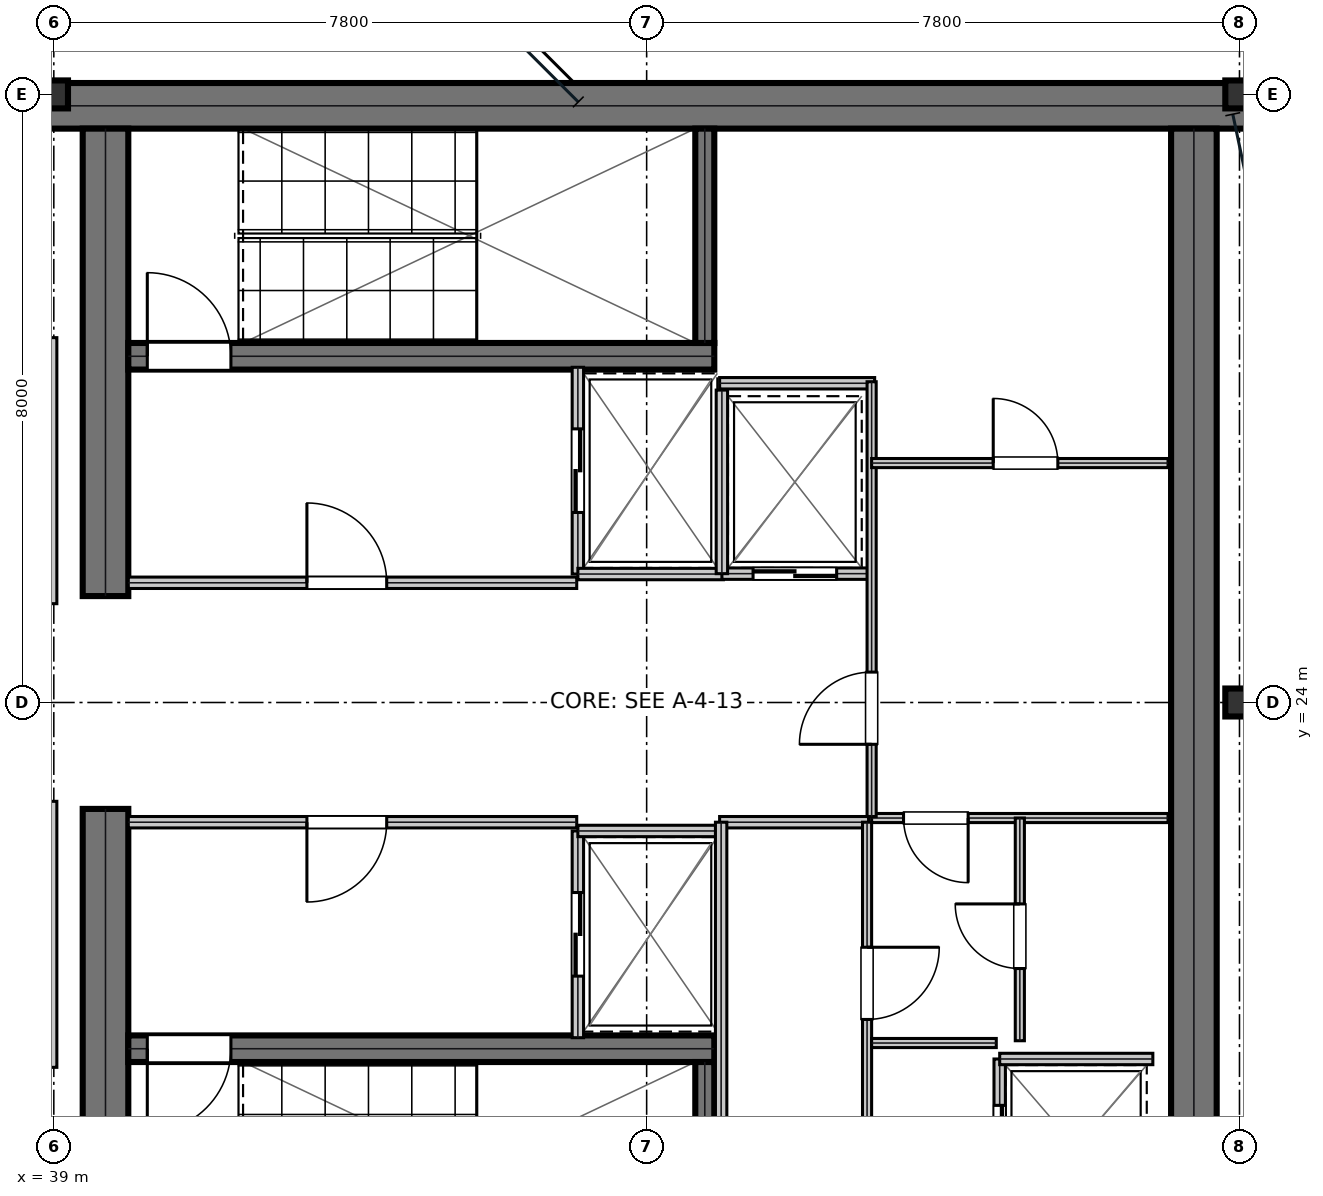
"""IFC4 building model, lengths in metres.
Left out: names, types, materials, properties, quantities, classifications, styles, units other than length and angle.
Written with IfcOpenShell. Run it as: python <this file> out.ifc"""

import sys

from ifc_helpers import new_model, si_unit, direction, frame, frame_2d, origin, origin_2d, place, context, subcontext, project, spatial, rectangle, i_section, extrude, element, fill, save


model = new_model("IFC4")
c1 = context("Model", 3, precision=1e-05, world=origin(), true_north=direction((0.0, 1.0)))
c2 = subcontext(c1, "Body", "Model", "MODEL_VIEW")
j1 = project(units=[si_unit("LENGTHUNIT", "METRE"), si_unit("PLANEANGLEUNIT", "RADIAN")], contexts=[c1])
p1 = place(None, origin())
s1 = spatial("IfcSite", under=j1, at=p1, CompositionType="ELEMENT")
p2 = place(p1, origin())
s2 = spatial("IfcBuilding", under=s1, at=p2, CompositionType="ELEMENT")
p3 = place(p2, frame((0.0, 0.0, 307.35)))
s3 = spatial("IfcBuildingStorey", under=s2, at=p3, CompositionType="ELEMENT", Elevation=307.35)
p4 = place(p3, frame((38.8, 31.85, 0.0), z_axis=(0.0, 0.0, 1.0), x_axis=(1.0, 0.0, 0.0)))
e1 = element("IfcWall", 1, at=p4, inside=s3, PredefinedType="SHEAR", context=c2, shape_type="SweptSolid", body=[
    extrude(rectangle(XDim=16.0, YDim=0.6, at=frame_2d((8.0, 0.0))), origin(), (0.0, 0.0, 1.0), 3.81),
])
for number, where, z_axis, x_axis in (
    (2, (39.68, 16.45, 0.0), (0.0, 0.0, 1.0), (0.0, 1.0, 0.0)),
    (3, (39.68, 25.4, 0.0), (0.0, 0.0, 1.0), (0.0, 1.0, 0.0)),
):
    element("IfcWall", number, at=place(p3, frame(where, z_axis=z_axis, x_axis=x_axis)), inside=s3, PredefinedType="SHEAR", context=c2, shape_type="SweptSolid", body=[
        extrude(rectangle(XDim=6.15, YDim=0.6, at=frame_2d((3.075, 0.0))), origin(), (0.0, 0.0, 1.0), 3.81),
    ])
p5 = place(p3, frame((54.0, 16.45, 0.0), z_axis=(0.0, 0.0, 1.0), x_axis=(0.0, 1.0, 0.0)))
e4 = element("IfcWall", 4, at=p5, inside=s3, PredefinedType="SHEAR", context=c2, shape_type="SweptSolid", body=[
    extrude(rectangle(XDim=15.1, YDim=0.6, at=frame_2d((7.55, 0.0))), origin(), (0.0, 0.0, 1.0), 3.81),
])
p6 = place(p3, frame((39.98, 28.555, 0.0), z_axis=(0.0, 0.0, 1.0), x_axis=(1.0, 0.0, 0.0)))
e5 = element("IfcWall", 5, at=p6, inside=s3, PredefinedType="SHEAR", context=c2, shape_type="SweptSolid", body=[
    extrude(rectangle(XDim=7.71, YDim=0.35, at=frame_2d((3.855, 0.0))), origin(), (0.0, 0.0, 1.0), 3.81),
])
p7 = place(p6, frame((0.25, 0.0, 0.0)))
e6 = element("IfcOpeningElement", 6, at=p7, cuts=e5, PredefinedType="OPENING", context=c2, shape_type="SweptSolid", body=[
    extrude(rectangle(XDim=1.1, YDim=2.15, at=frame_2d((0.55, 1.075))), frame((0.0, 0.185, 0.0), z_axis=(0.0, -1.0, 0.0), x_axis=(1.0, 0.0, 0.0)), (0.0, 0.0, 1.0), 0.37),
])
p8 = place(p3, frame((39.98, 19.445, 0.0), z_axis=(0.0, 0.0, 1.0), x_axis=(1.0, 0.0, 0.0)))
e7 = element("IfcWall", 7, at=p8, inside=s3, PredefinedType="SHEAR", context=c2, shape_type="SweptSolid", body=[
    extrude(rectangle(XDim=7.71, YDim=0.35, at=frame_2d((3.855, 0.0))), origin(), (0.0, 0.0, 1.0), 3.81),
])
p9 = place(p8, frame((0.25, 0.0, 0.0)))
e8 = element("IfcOpeningElement", 8, at=p9, cuts=e7, PredefinedType="OPENING", context=c2, shape_type="SweptSolid", body=[
    extrude(rectangle(XDim=1.1, YDim=2.15, at=frame_2d((0.55, 1.075))), frame((0.0, 0.185, 0.0), z_axis=(0.0, -1.0, 0.0), x_axis=(1.0, 0.0, 0.0)), (0.0, 0.0, 1.0), 0.37),
])
for number, where, z_axis, x_axis in (
    (9, (47.565, 28.73, 0.0), (0.0, 0.0, 1.0), (0.0, 1.0, 0.0)),
    (10, (47.565, 16.45, 0.0), (0.0, 0.0, 1.0), (0.0, 1.0, 0.0)),
):
    element("IfcWall", number, at=place(p3, frame(where, z_axis=z_axis, x_axis=x_axis)), inside=s3, PredefinedType="SHEAR", context=c2, shape_type="SweptSolid", body=[
        extrude(rectangle(XDim=2.82, YDim=0.25, at=frame_2d((1.41, 0.0))), origin(), (0.0, 0.0, 1.0), 3.81),
    ])
for number, where, z_axis, x_axis in (
    (11, (39.0, 32.0, 0.0), (0.0, 0.0, 1.0), (1.0, 0.0, 0.0)),
    (12, (54.6, 24.0, 0.0), (0.0, 0.0, 1.0), (1.0, 0.0, 0.0)),
    (13, (54.6, 32.0, 0.0), (0.0, 0.0, 1.0), (1.0, 0.0, 0.0)),
):
    element("IfcColumn", number, at=place(p3, frame(where, z_axis=z_axis, x_axis=x_axis)), inside=s3, PredefinedType="COLUMN", context=c2, shape_type="SweptSolid", body=[
        extrude(i_section(OverallWidth=0.373, OverallDepth=0.368, WebThickness=0.015, FlangeThickness=0.024, at=origin_2d()), origin(), (0.0, 0.0, 1.0), 4.044),
    ])
p10 = place(p3, frame((39.98, 25.575, 0.0), z_axis=(0.0, 0.0, 1.0), x_axis=(1.0, 0.0, 0.0)))
e14 = element("IfcWall", 14, at=p10, inside=s3, PredefinedType="PARTITIONING", context=c2, shape_type="SweptSolid", body=[
    extrude(rectangle(XDim=5.9, YDim=0.15, at=frame_2d((2.95, 0.0))), origin(), (0.0, 0.0, 1.0), 3.81),
])
p11 = place(p10, frame((2.35, 0.0, 0.0)))
e15 = element("IfcOpeningElement", 15, at=p11, cuts=e14, PredefinedType="OPENING", context=c2, shape_type="SweptSolid", body=[
    extrude(rectangle(XDim=1.05, YDim=2.15, at=frame_2d((0.525, 1.075))), frame((0.0, 0.085, 0.0), z_axis=(0.0, -1.0, 0.0), x_axis=(1.0, 0.0, 0.0)), (0.0, 0.0, 1.0), 0.17),
])
p12 = place(p3, frame((39.98, 22.425, 0.0), z_axis=(0.0, 0.0, 1.0), x_axis=(1.0, 0.0, 0.0)))
e16 = element("IfcWall", 16, at=p12, inside=s3, PredefinedType="PARTITIONING", context=c2, shape_type="SweptSolid", body=[
    extrude(rectangle(XDim=5.9, YDim=0.15, at=frame_2d((2.95, 0.0))), origin(), (0.0, 0.0, 1.0), 3.81),
])
p13 = place(p12, frame((2.35, 0.0, 0.0)))
e17 = element("IfcOpeningElement", 17, at=p13, cuts=e16, PredefinedType="OPENING", context=c2, shape_type="SweptSolid", body=[
    extrude(rectangle(XDim=1.05, YDim=2.15, at=frame_2d((0.525, 1.075))), frame((0.0, 0.085, 0.0), z_axis=(0.0, -1.0, 0.0), x_axis=(1.0, 0.0, 0.0)), (0.0, 0.0, 1.0), 0.17),
])
p14 = place(p3, frame((45.895, 25.69, 0.0), z_axis=(0.0, 0.0, 1.0), x_axis=(0.0, 1.0, 0.0)))
e18 = element("IfcWall", 18, at=p14, inside=s3, PredefinedType="PARTITIONING", context=c2, shape_type="SweptSolid", body=[
    extrude(rectangle(XDim=2.72, YDim=0.15, at=frame_2d((1.36, 0.0))), origin(), (0.0, 0.0, 1.0), 3.81),
])
p15 = place(p14, frame((0.81, 0.0, 0.0)))
e19 = element("IfcOpeningElement", 19, at=p15, cuts=e18, PredefinedType="OPENING", context=c2, shape_type="SweptSolid", body=[
    extrude(rectangle(XDim=1.1, YDim=2.15, at=frame_2d((0.55, 1.075))), frame((0.0, 0.085, 0.0), z_axis=(0.0, -1.0, 0.0), x_axis=(1.0, 0.0, 0.0)), (0.0, 0.0, 1.0), 0.17),
])
p16 = place(p3, frame((45.895, 25.69, 0.0), z_axis=(0.0, 0.0, 1.0), x_axis=(1.0, 0.0, 0.0)))
e20 = element("IfcWall", 20, at=p16, inside=s3, PredefinedType="PARTITIONING", context=c2, shape_type="SweptSolid", body=[
    extrude(rectangle(XDim=1.915, YDim=0.15, at=frame_2d((0.958, 0.0))), origin(), (0.0, 0.0, 1.0), 3.81),
])
p17 = place(p3, frame((45.895, 19.59, 0.0), z_axis=(0.0, 0.0, 1.0), x_axis=(0.0, 1.0, 0.0)))
e21 = element("IfcWall", 21, at=p17, inside=s3, PredefinedType="PARTITIONING", context=c2, shape_type="SweptSolid", body=[
    extrude(rectangle(XDim=2.72, YDim=0.15, at=frame_2d((1.36, 0.0))), origin(), (0.0, 0.0, 1.0), 3.81),
])
p18 = place(p17, frame((0.81, 0.0, 0.0)))
e22 = element("IfcOpeningElement", 22, at=p18, cuts=e21, PredefinedType="OPENING", context=c2, shape_type="SweptSolid", body=[
    extrude(rectangle(XDim=1.1, YDim=2.15, at=frame_2d((0.55, 1.075))), frame((0.0, 0.085, 0.0), z_axis=(0.0, -1.0, 0.0), x_axis=(1.0, 0.0, 0.0)), (0.0, 0.0, 1.0), 0.17),
])
p19 = place(p3, frame((45.895, 22.31, 0.0), z_axis=(0.0, 0.0, 1.0), x_axis=(1.0, 0.0, 0.0)))
e23 = element("IfcWall", 23, at=p19, inside=s3, PredefinedType="PARTITIONING", context=c2, shape_type="SweptSolid", body=[
    extrude(rectangle(XDim=1.915, YDim=0.15, at=frame_2d((0.958, 0.0))), origin(), (0.0, 0.0, 1.0), 3.81),
])
p20 = place(p3, frame((47.79, 25.695, 0.0), z_axis=(0.0, 0.0, 1.0), x_axis=(1.0, 0.0, 0.0)))
e24 = element("IfcWall", 24, at=p20, inside=s3, PredefinedType="PARTITIONING", context=c2, shape_type="SweptSolid", body=[
    extrude(rectangle(XDim=1.92, YDim=0.15, at=frame_2d((0.96, 0.0))), origin(), (0.0, 0.0, 1.0), 3.81),
])
p21 = place(p20, frame((0.41, 0.0, 0.0)))
e25 = element("IfcOpeningElement", 25, at=p21, cuts=e24, PredefinedType="OPENING", context=c2, shape_type="SweptSolid", body=[
    extrude(rectangle(XDim=1.1, YDim=2.15, at=frame_2d((0.55, 1.075))), frame((0.0, 0.085, 0.0), z_axis=(0.0, -1.0, 0.0), x_axis=(1.0, 0.0, 0.0)), (0.0, 0.0, 1.0), 0.17),
])
p22 = place(p3, frame((47.79, 25.695, 0.0), z_axis=(0.0, 0.0, 1.0), x_axis=(0.0, 1.0, 0.0)))
e26 = element("IfcWall", 26, at=p22, inside=s3, PredefinedType="PARTITIONING", context=c2, shape_type="SweptSolid", body=[
    extrude(rectangle(XDim=2.415, YDim=0.15, at=frame_2d((1.208, 0.0))), origin(), (0.0, 0.0, 1.0), 3.81),
])
p23 = place(p3, frame((51.445, 16.99, 0.0), z_axis=(0.0, 0.0, 1.0), x_axis=(0.0, 1.0, 0.0)))
e27 = element("IfcWall", 27, at=p23, inside=s3, PredefinedType="PARTITIONING", context=c2, shape_type="SweptSolid", body=[
    extrude(rectangle(XDim=2.32, YDim=0.15, at=frame_2d((1.16, 0.0))), origin(), (0.0, 0.0, 1.0), 3.81),
])
p24 = place(p23, frame((0.61, 0.0, 0.0)))
e28 = element("IfcOpeningElement", 28, at=p24, cuts=e27, PredefinedType="OPENING", context=c2, shape_type="SweptSolid", body=[
    extrude(rectangle(XDim=1.1, YDim=2.15, at=frame_2d((0.55, 1.075))), frame((0.0, 0.085, 0.0), z_axis=(0.0, -1.0, 0.0), x_axis=(1.0, 0.0, 0.0)), (0.0, 0.0, 1.0), 0.17),
])
p25 = place(p3, frame((51.445, 19.31, 0.0), z_axis=(0.0, 0.0, 1.0), x_axis=(1.0, 0.0, 0.0)))
e29 = element("IfcWall", 29, at=p25, inside=s3, PredefinedType="PARTITIONING", context=c2, shape_type="SweptSolid", body=[
    extrude(rectangle(XDim=2.015, YDim=0.15, at=frame_2d((1.007, 0.0))), origin(), (0.0, 0.0, 1.0), 3.81),
])
p26 = place(p3, frame((47.76, 22.425, 0.0), z_axis=(0.0, 0.0, 1.0), x_axis=(1.0, 0.0, 0.0)))
e30 = element("IfcWall", 30, at=p26, inside=s3, PredefinedType="PARTITIONING", context=c2, shape_type="SweptSolid", body=[
    extrude(rectangle(XDim=1.96, YDim=0.15, at=frame_2d((0.98, 0.0))), origin(), (0.0, 0.0, 1.0), 3.81),
])
p27 = place(p3, frame((47.78, 16.45, 0.0), z_axis=(0.0, 0.0, 1.0), x_axis=(0.0, 1.0, 0.0)))
e31 = element("IfcWall", 31, at=p27, inside=s3, PredefinedType="PARTITIONING", context=c2, shape_type="SweptSolid", body=[
    extrude(rectangle(XDim=5.975, YDim=0.15, at=frame_2d((2.988, 0.0))), origin(), (0.0, 0.0, 1.0), 3.81),
])
p28 = place(p3, frame((49.7, 16.48, 0.0), z_axis=(0.0, 0.0, 1.0), x_axis=(0.0, 1.0, 0.0)))
e32 = element("IfcWall", 32, at=p28, inside=s3, PredefinedType="PARTITIONING", context=c2, shape_type="SweptSolid", body=[
    extrude(rectangle(XDim=5.945, YDim=0.12, at=frame_2d((2.973, 0.0))), origin(), (0.0, 0.0, 1.0), 3.81),
])
p29 = place(p28, frame((3.35, 0.0, 0.0)))
e33 = element("IfcOpeningElement", 33, at=p29, cuts=e32, PredefinedType="OPENING", context=c2, shape_type="SweptSolid", body=[
    extrude(rectangle(XDim=0.95, YDim=2.15, at=frame_2d((0.475, 1.075))), frame((0.0, 0.07, 0.0), z_axis=(0.0, -1.0, 0.0), x_axis=(1.0, 0.0, 0.0)), (0.0, 0.0, 1.0), 0.14),
])
p30 = place(p3, frame((49.76, 22.48, 0.0), z_axis=(0.0, 0.0, 1.0), x_axis=(1.0, 0.0, 0.0)))
e34 = element("IfcWall", 34, at=p30, inside=s3, PredefinedType="PARTITIONING", context=c2, shape_type="SweptSolid", body=[
    extrude(rectangle(XDim=3.9, YDim=0.12, at=frame_2d((1.95, 0.0))), origin(), (0.0, 0.0, 1.0), 3.81),
])
p31 = place(p30, frame((0.42, 0.0, 0.0)))
e35 = element("IfcOpeningElement", 35, at=p31, cuts=e34, PredefinedType="OPENING", context=c2, shape_type="SweptSolid", body=[
    extrude(rectangle(XDim=0.85, YDim=2.15, at=frame_2d((0.425, 1.075))), frame((0.0, 0.07, 0.0), z_axis=(0.0, -1.0, 0.0), x_axis=(1.0, 0.0, 0.0)), (0.0, 0.0, 1.0), 0.14),
])
p32 = place(p3, frame((51.71, 19.55, 0.0), z_axis=(0.0, 0.0, 1.0), x_axis=(0.0, 1.0, 0.0)))
e36 = element("IfcWall", 36, at=p32, inside=s3, PredefinedType="PARTITIONING", context=c2, shape_type="SweptSolid", body=[
    extrude(rectangle(XDim=2.93, YDim=0.12, at=frame_2d((1.465, 0.0))), origin(), (0.0, 0.0, 1.0), 3.81),
])
p33 = place(p32, frame((0.95, 0.0, 0.0)))
e37 = element("IfcOpeningElement", 37, at=p33, cuts=e36, PredefinedType="OPENING", context=c2, shape_type="SweptSolid", body=[
    extrude(rectangle(XDim=0.85, YDim=2.15, at=frame_2d((0.425, 1.075))), frame((0.0, 0.07, 0.0), z_axis=(0.0, -1.0, 0.0), x_axis=(1.0, 0.0, 0.0)), (0.0, 0.0, 1.0), 0.14),
])
p34 = place(p3, frame((49.76, 19.52, 0.0), z_axis=(0.0, 0.0, 1.0), x_axis=(1.0, 0.0, 0.0)))
e38 = element("IfcWall", 38, at=p34, inside=s3, PredefinedType="PARTITIONING", context=c2, shape_type="SweptSolid", body=[
    extrude(rectangle(XDim=1.64, YDim=0.12, at=frame_2d((0.82, 0.0))), origin(), (0.0, 0.0, 1.0), 3.81),
])
p35 = place(p3, frame((47.76, 28.2, 0.0), z_axis=(0.0, 0.0, 1.0), x_axis=(1.0, 0.0, 0.0)))
e39 = element("IfcWall", 39, at=p35, inside=s3, PredefinedType="PARTITIONING", context=c2, shape_type="SweptSolid", body=[
    extrude(rectangle(XDim=2.04, YDim=0.15, at=frame_2d((1.02, 0.0))), origin(), (0.0, 0.0, 1.0), 3.81),
])
p36 = place(p3, frame((49.76, 22.5, 0.0), z_axis=(0.0, 0.0, 1.0), x_axis=(0.0, 1.0, 0.0)))
e40 = element("IfcWall", 40, at=p36, inside=s3, PredefinedType="PARTITIONING", context=c2, shape_type="SweptSolid", body=[
    extrude(rectangle(XDim=5.72, YDim=0.12, at=frame_2d((2.86, 0.0))), origin(), (0.0, 0.0, 1.0), 3.81),
])
p37 = place(p36, frame((0.95, 0.0, 0.0)))
e41 = element("IfcOpeningElement", 41, at=p37, cuts=e40, PredefinedType="OPENING", context=c2, shape_type="SweptSolid", body=[
    extrude(rectangle(XDim=0.95, YDim=2.15, at=frame_2d((0.475, 1.075))), frame((0.0, 0.07, 0.0), z_axis=(0.0, -1.0, 0.0), x_axis=(1.0, 0.0, 0.0)), (0.0, 0.0, 1.0), 0.14),
])
p38 = place(p3, frame((49.76, 27.15, 0.0), z_axis=(0.0, 0.0, 1.0), x_axis=(1.0, 0.0, 0.0)))
e42 = element("IfcWall", 42, at=p38, inside=s3, PredefinedType="PARTITIONING", context=c2, shape_type="SweptSolid", body=[
    extrude(rectangle(XDim=3.9, YDim=0.12, at=frame_2d((1.95, 0.0))), origin(), (0.0, 0.0, 1.0), 3.81),
])
p39 = place(p38, frame((1.6, 0.0, 0.0)))
e43 = element("IfcOpeningElement", 43, at=p39, cuts=e42, PredefinedType="OPENING", context=c2, shape_type="SweptSolid", body=[
    extrude(rectangle(XDim=0.85, YDim=2.15, at=frame_2d((0.425, 1.075))), frame((0.0, 0.07, 0.0), z_axis=(0.0, -1.0, 0.0), x_axis=(1.0, 0.0, 0.0)), (0.0, 0.0, 1.0), 0.14),
])
for number, where, z_axis, x_axis in (
    (44, (38.95, 19.2, 0.0), (0.0, 0.0, 1.0), (0.0, 1.0, 0.0)),
    (45, (38.95, 25.3, 0.0), (0.0, 0.0, 1.0), (0.0, 1.0, 0.0)),
):
    element("IfcWall", number, at=place(p3, frame(where, z_axis=z_axis, x_axis=x_axis)), inside=s3, PredefinedType="SOLIDWALL", context=c2, shape_type="SweptSolid", body=[
        extrude(rectangle(XDim=3.5, YDim=0.18, at=frame_2d((1.75, 0.0))), origin(), (0.0, 0.0, 1.0), 3.54),
    ])
p40 = place(p11, origin())
e46 = element("IfcDoor", 46, at=p40, inside=s3, OperationType="SINGLE_SWING_LEFT", PredefinedType="DOOR", context=c2, shape_type="SweptSolid", body=[
    extrude(rectangle(XDim=1.05, YDim=2.15, at=frame_2d((0.525, 1.075))), frame((0.0, 0.025, 0.0), z_axis=(0.0, -1.0, 0.0), x_axis=(1.0, 0.0, 0.0)), (0.0, 0.0, 1.0), 0.05),
])
fill(e15, e46)
p41 = place(p13, frame((1.05, 0.0, 0.0), z_axis=(0.0, 0.0, 1.0), x_axis=(-1.0, 0.0, 0.0)))
e47 = element("IfcDoor", 47, at=p41, inside=s3, OperationType="SINGLE_SWING_RIGHT", PredefinedType="DOOR", context=c2, shape_type="SweptSolid", body=[
    extrude(rectangle(XDim=1.05, YDim=2.15, at=frame_2d((0.525, 1.075))), frame((0.0, 0.025, 0.0), z_axis=(0.0, -1.0, 0.0), x_axis=(1.0, 0.0, 0.0)), (0.0, 0.0, 1.0), 0.05),
])
fill(e17, e47)
p42 = place(p15, frame((1.1, 0.0, 0.0), z_axis=(0.0, 0.0, 1.0), x_axis=(-1.0, 0.0, 0.0)))
e48 = element("IfcDoor", 48, at=p42, inside=s3, OperationType="DOUBLE_DOOR_SLIDING", PredefinedType="DOOR", context=c2, shape_type="SweptSolid", body=[
    extrude(rectangle(XDim=1.1, YDim=2.15, at=frame_2d((0.55, 1.075))), frame((0.0, 0.025, 0.0), z_axis=(0.0, -1.0, 0.0), x_axis=(1.0, 0.0, 0.0)), (0.0, 0.0, 1.0), 0.05),
])
fill(e19, e48)
p43 = place(p18, frame((1.1, 0.0, 0.0), z_axis=(0.0, 0.0, 1.0), x_axis=(-1.0, 0.0, 0.0)))
e49 = element("IfcDoor", 49, at=p43, inside=s3, OperationType="DOUBLE_DOOR_SLIDING", PredefinedType="DOOR", context=c2, shape_type="SweptSolid", body=[
    extrude(rectangle(XDim=1.1, YDim=2.15, at=frame_2d((0.55, 1.075))), frame((0.0, 0.025, 0.0), z_axis=(0.0, -1.0, 0.0), x_axis=(1.0, 0.0, 0.0)), (0.0, 0.0, 1.0), 0.05),
])
fill(e22, e49)
p44 = place(p21, frame((1.1, 0.0, 0.0), z_axis=(0.0, 0.0, 1.0), x_axis=(-1.0, 0.0, 0.0)))
e50 = element("IfcDoor", 50, at=p44, inside=s3, OperationType="DOUBLE_DOOR_SLIDING", PredefinedType="DOOR", context=c2, shape_type="SweptSolid", body=[
    extrude(rectangle(XDim=1.1, YDim=2.15, at=frame_2d((0.55, 1.075))), frame((0.0, 0.025, 0.0), z_axis=(0.0, -1.0, 0.0), x_axis=(1.0, 0.0, 0.0)), (0.0, 0.0, 1.0), 0.05),
])
fill(e25, e50)
p45 = place(p24, frame((1.1, 0.0, 0.0), z_axis=(0.0, 0.0, 1.0), x_axis=(-1.0, 0.0, 0.0)))
e51 = element("IfcDoor", 51, at=p45, inside=s3, OperationType="DOUBLE_DOOR_SLIDING", PredefinedType="DOOR", context=c2, shape_type="SweptSolid", body=[
    extrude(rectangle(XDim=1.1, YDim=2.15, at=frame_2d((0.55, 1.075))), frame((0.0, 0.025, 0.0), z_axis=(0.0, -1.0, 0.0), x_axis=(1.0, 0.0, 0.0)), (0.0, 0.0, 1.0), 0.05),
])
fill(e28, e51)
p46 = place(p29, frame((0.95, 0.0, 0.0), z_axis=(0.0, 0.0, 1.0), x_axis=(-1.0, 0.0, 0.0)))
e52 = element("IfcDoor", 52, at=p46, inside=s3, OperationType="SINGLE_SWING_LEFT", PredefinedType="DOOR", context=c2, shape_type="SweptSolid", body=[
    extrude(rectangle(XDim=0.95, YDim=2.15, at=frame_2d((0.475, 1.075))), frame((0.0, 0.025, 0.0), z_axis=(0.0, -1.0, 0.0), x_axis=(1.0, 0.0, 0.0)), (0.0, 0.0, 1.0), 0.05),
])
fill(e33, e52)
p47 = place(p31, frame((0.85, 0.0, 0.0), z_axis=(0.0, 0.0, 1.0), x_axis=(-1.0, 0.0, 0.0)))
e53 = element("IfcDoor", 53, at=p47, inside=s3, OperationType="SINGLE_SWING_LEFT", PredefinedType="DOOR", context=c2, shape_type="SweptSolid", body=[
    extrude(rectangle(XDim=0.85, YDim=2.15, at=frame_2d((0.425, 1.075))), frame((0.0, 0.025, 0.0), z_axis=(0.0, -1.0, 0.0), x_axis=(1.0, 0.0, 0.0)), (0.0, 0.0, 1.0), 0.05),
])
fill(e35, e53)
p48 = place(p33, origin())
e54 = element("IfcDoor", 54, at=p48, inside=s3, OperationType="SINGLE_SWING_RIGHT", PredefinedType="DOOR", context=c2, shape_type="SweptSolid", body=[
    extrude(rectangle(XDim=0.85, YDim=2.15, at=frame_2d((0.425, 1.075))), frame((0.0, 0.025, 0.0), z_axis=(0.0, -1.0, 0.0), x_axis=(1.0, 0.0, 0.0)), (0.0, 0.0, 1.0), 0.05),
])
fill(e37, e54)
p49 = place(p37, origin())
e55 = element("IfcDoor", 55, at=p49, inside=s3, OperationType="SINGLE_SWING_LEFT", PredefinedType="DOOR", context=c2, shape_type="SweptSolid", body=[
    extrude(rectangle(XDim=0.95, YDim=2.15, at=frame_2d((0.475, 1.075))), frame((0.0, 0.025, 0.0), z_axis=(0.0, -1.0, 0.0), x_axis=(1.0, 0.0, 0.0)), (0.0, 0.0, 1.0), 0.05),
])
fill(e41, e55)
p50 = place(p39, origin())
e56 = element("IfcDoor", 56, at=p50, inside=s3, OperationType="SINGLE_SWING_LEFT", PredefinedType="DOOR", context=c2, shape_type="SweptSolid", body=[
    extrude(rectangle(XDim=0.85, YDim=2.15, at=frame_2d((0.425, 1.075))), frame((0.0, 0.025, 0.0), z_axis=(0.0, -1.0, 0.0), x_axis=(1.0, 0.0, 0.0)), (0.0, 0.0, 1.0), 0.05),
])
fill(e43, e56)
p51 = place(p7, origin())
e57 = element("IfcDoor", 57, at=p51, inside=s3, OperationType="SINGLE_SWING_LEFT", PredefinedType="DOOR", context=c2, shape_type="SweptSolid", body=[
    extrude(rectangle(XDim=1.1, YDim=2.15, at=frame_2d((0.55, 1.075))), frame((0.0, 0.025, 0.0), z_axis=(0.0, -1.0, 0.0), x_axis=(1.0, 0.0, 0.0)), (0.0, 0.0, 1.0), 0.05),
])
fill(e6, e57)
p52 = place(p9, frame((1.1, 0.0, 0.0), z_axis=(0.0, 0.0, 1.0), x_axis=(-1.0, 0.0, 0.0)))
e58 = element("IfcDoor", 58, at=p52, inside=s3, OperationType="SINGLE_SWING_RIGHT", PredefinedType="DOOR", context=c2, shape_type="SweptSolid", body=[
    extrude(rectangle(XDim=1.1, YDim=2.15, at=frame_2d((0.55, 1.075))), frame((0.0, 0.025, 0.0), z_axis=(0.0, -1.0, 0.0), x_axis=(1.0, 0.0, 0.0)), (0.0, 0.0, 1.0), 0.05),
])
fill(e8, e58)
save(model, sys.argv[1])
